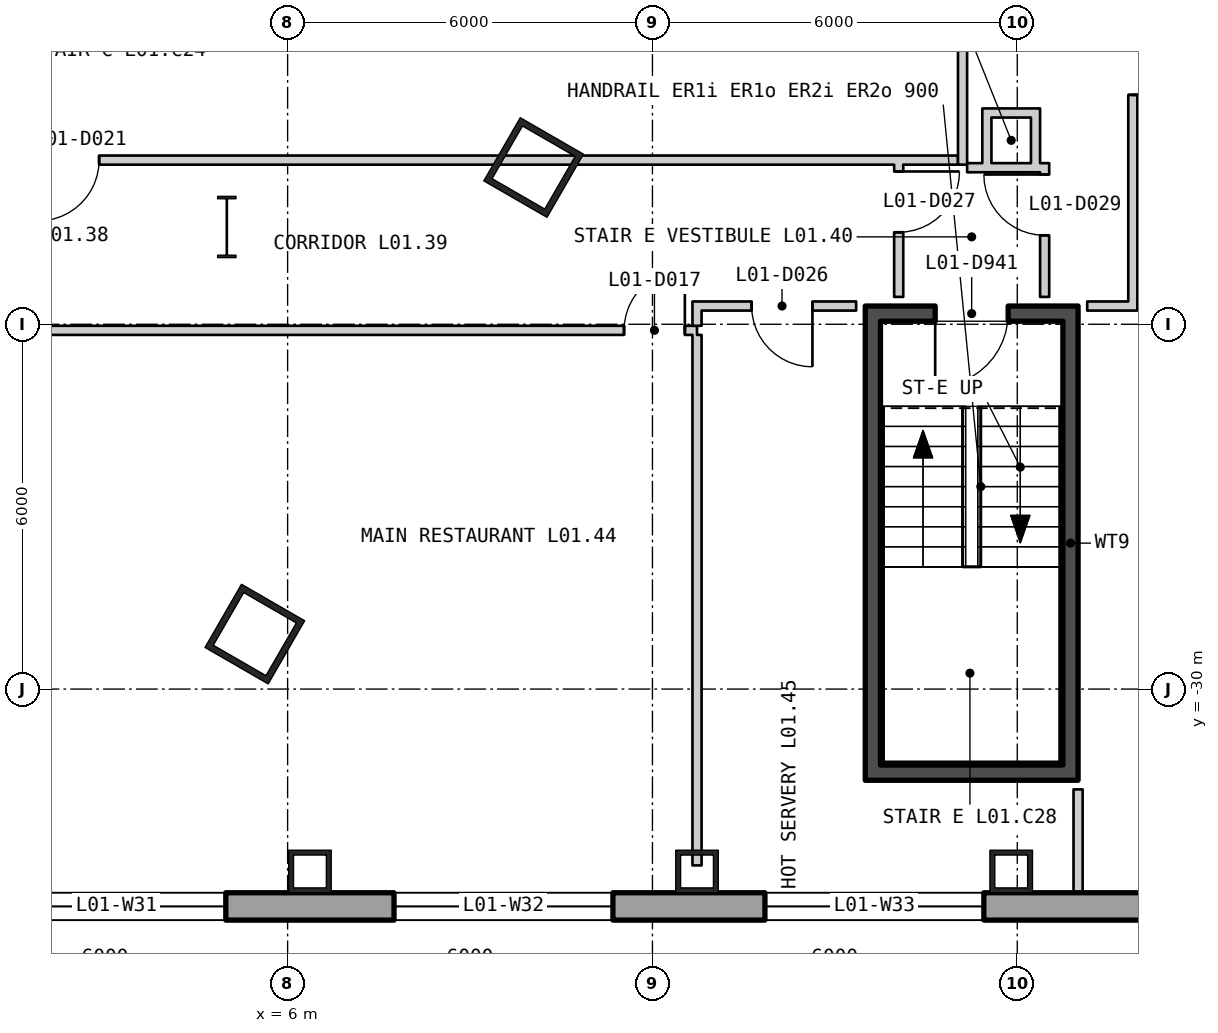
"""IFC4 building model, lengths in metres.
Left out: names, types, materials, properties, quantities, classifications, styles, units other than length and angle.
Written with IfcOpenShell. Run it as: python <this file> out.ifc"""

import sys

from ifc_helpers import new_model, si_unit, direction, frame, frame_2d, origin, origin_2d, place, context, subcontext, project, spatial, polyline, rectangle, hollow_rectangle, i_section, outline, extrude, element, fill, save


model = new_model("IFC4")
c1 = context("Model", 3, precision=1e-05, world=origin(), true_north=direction((0.0, 1.0)))
c2 = subcontext(c1, "Body", "Model", "MODEL_VIEW")
j1 = project(units=[si_unit("LENGTHUNIT", "METRE"), si_unit("PLANEANGLEUNIT", "RADIAN")], contexts=[c1])
p1 = place(None, origin())
s1 = spatial("IfcSite", under=j1, at=p1, CompositionType="ELEMENT")
p2 = place(p1, origin())
s2 = spatial("IfcBuilding", under=s1, at=p2, CompositionType="ELEMENT")
p3 = place(p2, frame((0.0, 0.0, 8.4)))
s3 = spatial("IfcBuildingStorey", under=s2, at=p3, CompositionType="ELEMENT", Elevation=8.4)
for number, where, z_axis, x_axis in (
    (1, (5.461, -29.096, 0.0), (0.0, 0.0, 1.0), (0.5, 0.866, 0.0)),
    (2, (10.046, -21.422, 0.0), (0.0, 0.0, 1.0), (0.5, 0.866, 0.0)),
):
    element("IfcColumn", number, at=place(p3, frame(where, z_axis=z_axis, x_axis=x_axis)), inside=s3, PredefinedType="COLUMN", context=c2, shape_type="SweptSolid", body=[
        extrude(hollow_rectangle(XDim=1.2, YDim=1.2, WallThickness=0.1, at=origin_2d()), origin(), (0.0, 0.0, 1.0), 5.1),
    ])
p4 = place(p3, frame((5.0, -22.4, 0.0), z_axis=(0.0, 0.0, 1.0), x_axis=(1.0, 0.0, 0.0)))
e3 = element("IfcColumn", 3, at=p4, inside=s3, PredefinedType="COLUMN", context=c2, shape_type="SweptSolid", body=[
    extrude(i_section(OverallWidth=0.302, OverallDepth=1.008, WebThickness=0.021, FlangeThickness=0.04, at=origin_2d()), origin(), (0.0, 0.0, 1.0), 5.1),
])
for number, where, z_axis, x_axis in (
    (4, (6.367, -33.0, 0.0), (0.0, 0.0, 1.0), (1.0, 0.0, 0.0)),
    (5, (12.733, -33.0, 0.0), (0.0, 0.0, 1.0), (1.0, 0.0, 0.0)),
    (6, (17.9, -33.0, 0.0), (0.0, 0.0, 1.0), (1.0, 0.0, 0.0)),
):
    element("IfcColumn", number, at=place(p3, frame(where, z_axis=z_axis, x_axis=x_axis)), inside=s3, PredefinedType="COLUMN", context=c2, shape_type="SweptSolid", body=[
        extrude(hollow_rectangle(XDim=0.7, YDim=0.7, WallThickness=0.08, at=origin_2d()), origin(), (0.0, 0.0, 1.0), 5.1),
    ])
p5 = place(p3, frame((-38.775, -33.575, -0.4), z_axis=(0.0, 0.0, 1.0), x_axis=(1.0, 0.0, 0.0)))
e7 = element("IfcWall", 7, at=p5, inside=s3, PredefinedType="SOLIDWALL", context=c2, shape_type="SweptSolid", body=[
    extrude(outline(polyline([(-0.225, -0.225), (77.775, -0.225), (77.325, 0.225), (0.225, 0.225), (-0.225, -0.225)])), origin(), (0.0, 0.0, 1.0), 5.1),
])
p6 = place(p5, frame((1.958, 0.0, 1.3)))
e8 = element("IfcOpeningElement", 8, at=p6, cuts=e7, PredefinedType="OPENING", context=c2, shape_type="SweptSolid", body=[
    extrude(rectangle(XDim=3.6, YDim=3.2, at=frame_2d((1.8, 1.6))), frame((0.0, 0.235, 0.0), z_axis=(0.0, -1.0, 0.0), x_axis=(1.0, 0.0, 0.0)), (0.0, 0.0, 1.0), 0.47),
])
p7 = place(p5, frame((8.325, 0.0, 1.3)))
e9 = element("IfcOpeningElement", 9, at=p7, cuts=e7, PredefinedType="OPENING", context=c2, shape_type="SweptSolid", body=[
    extrude(rectangle(XDim=3.6, YDim=3.2, at=frame_2d((1.8, 1.6))), frame((0.0, 0.235, 0.0), z_axis=(0.0, -1.0, 0.0), x_axis=(1.0, 0.0, 0.0)), (0.0, 0.0, 1.0), 0.47),
])
p8 = place(p5, frame((14.692, 0.0, 1.3)))
e10 = element("IfcOpeningElement", 10, at=p8, cuts=e7, PredefinedType="OPENING", context=c2, shape_type="SweptSolid", body=[
    extrude(rectangle(XDim=3.6, YDim=3.2, at=frame_2d((1.8, 1.6))), frame((0.0, 0.235, 0.0), z_axis=(0.0, -1.0, 0.0), x_axis=(1.0, 0.0, 0.0)), (0.0, 0.0, 1.0), 0.47),
])
p9 = place(p5, frame((21.325, 0.0, 1.3)))
e11 = element("IfcOpeningElement", 11, at=p9, cuts=e7, PredefinedType="OPENING", context=c2, shape_type="SweptSolid", body=[
    extrude(rectangle(XDim=3.6, YDim=3.2, at=frame_2d((1.8, 1.6))), frame((0.0, 0.235, 0.0), z_axis=(0.0, -1.0, 0.0), x_axis=(1.0, 0.0, 0.0)), (0.0, 0.0, 1.0), 0.47),
])
p10 = place(p5, frame((27.425, 0.0, 1.3)))
e12 = element("IfcOpeningElement", 12, at=p10, cuts=e7, PredefinedType="OPENING", context=c2, shape_type="SweptSolid", body=[
    extrude(rectangle(XDim=3.6, YDim=3.2, at=frame_2d((1.8, 1.6))), frame((0.0, 0.235, 0.0), z_axis=(0.0, -1.0, 0.0), x_axis=(1.0, 0.0, 0.0)), (0.0, 0.0, 1.0), 0.47),
])
p11 = place(p5, frame((33.792, 0.0, 1.3)))
e13 = element("IfcOpeningElement", 13, at=p11, cuts=e7, PredefinedType="OPENING", context=c2, shape_type="SweptSolid", body=[
    extrude(rectangle(XDim=3.6, YDim=3.2, at=frame_2d((1.8, 1.6))), frame((0.0, 0.235, 0.0), z_axis=(0.0, -1.0, 0.0), x_axis=(1.0, 0.0, 0.0)), (0.0, 0.0, 1.0), 0.47),
])
p12 = place(p5, frame((40.158, 0.0, 1.3)))
e14 = element("IfcOpeningElement", 14, at=p12, cuts=e7, PredefinedType="OPENING", context=c2, shape_type="SweptSolid", body=[
    extrude(rectangle(XDim=3.6, YDim=3.2, at=frame_2d((1.8, 1.6))), frame((0.0, 0.235, 0.0), z_axis=(0.0, -1.0, 0.0), x_axis=(1.0, 0.0, 0.0)), (0.0, 0.0, 1.0), 0.47),
])
p13 = place(p5, frame((46.525, 0.0, 1.3)))
e15 = element("IfcOpeningElement", 15, at=p13, cuts=e7, PredefinedType="OPENING", context=c2, shape_type="SweptSolid", body=[
    extrude(rectangle(XDim=3.6, YDim=3.2, at=frame_2d((1.8, 1.6))), frame((0.0, 0.235, 0.0), z_axis=(0.0, -1.0, 0.0), x_axis=(1.0, 0.0, 0.0)), (0.0, 0.0, 1.0), 0.47),
])
p14 = place(p5, frame((52.625, 0.0, 1.3)))
e16 = element("IfcOpeningElement", 16, at=p14, cuts=e7, PredefinedType="OPENING", context=c2, shape_type="SweptSolid", body=[
    extrude(rectangle(XDim=3.6, YDim=3.2, at=frame_2d((1.8, 1.6))), frame((0.0, 0.235, 0.0), z_axis=(0.0, -1.0, 0.0), x_axis=(1.0, 0.0, 0.0)), (0.0, 0.0, 1.0), 0.47),
])
p15 = place(p5, frame((59.258, 0.0, 1.3)))
e17 = element("IfcOpeningElement", 17, at=p15, cuts=e7, PredefinedType="OPENING", context=c2, shape_type="SweptSolid", body=[
    extrude(rectangle(XDim=3.6, YDim=3.2, at=frame_2d((1.8, 1.6))), frame((0.0, 0.235, 0.0), z_axis=(0.0, -1.0, 0.0), x_axis=(1.0, 0.0, 0.0)), (0.0, 0.0, 1.0), 0.47),
])
p16 = place(p5, frame((65.625, 0.0, 1.3)))
e18 = element("IfcOpeningElement", 18, at=p16, cuts=e7, PredefinedType="OPENING", context=c2, shape_type="SweptSolid", body=[
    extrude(rectangle(XDim=3.6, YDim=3.2, at=frame_2d((1.8, 1.6))), frame((0.0, 0.235, 0.0), z_axis=(0.0, -1.0, 0.0), x_axis=(1.0, 0.0, 0.0)), (0.0, 0.0, 1.0), 0.47),
])
p17 = place(p5, frame((71.992, 0.0, 1.3)))
e19 = element("IfcOpeningElement", 19, at=p17, cuts=e7, PredefinedType="OPENING", context=c2, shape_type="SweptSolid", body=[
    extrude(rectangle(XDim=3.6, YDim=3.2, at=frame_2d((1.8, 1.6))), frame((0.0, 0.235, 0.0), z_axis=(0.0, -1.0, 0.0), x_axis=(1.0, 0.0, 0.0)), (0.0, 0.0, 1.0), 0.47),
])
for number, where, z_axis, x_axis in (
    (20, (15.625, -31.25, 0.0), (0.0, 0.0, 1.0), (0.0, 1.0, 0.0)),
    (21, (18.875, -31.25, 0.0), (0.0, 0.0, 1.0), (0.0, 1.0, 0.0)),
):
    element("IfcWall", number, at=place(p3, frame(where, z_axis=z_axis, x_axis=x_axis)), inside=s3, PredefinedType="SHEAR", context=c2, shape_type="SweptSolid", body=[
        extrude(rectangle(XDim=7.3, YDim=0.25, at=frame_2d((3.65, 0.0))), origin(), (0.0, 0.0, 1.0), 4.88),
    ])
p18 = place(p3, frame((15.5, -31.375, 0.0), z_axis=(0.0, 0.0, 1.0), x_axis=(1.0, 0.0, 0.0)))
e22 = element("IfcWall", 22, at=p18, inside=s3, PredefinedType="SHEAR", context=c2, shape_type="SweptSolid", body=[
    extrude(rectangle(XDim=3.5, YDim=0.25, at=frame_2d((1.75, 0.0))), origin(), (0.0, 0.0, 1.0), 4.88),
])
p19 = place(p3, frame((15.5, -23.825, 0.0), z_axis=(0.0, 0.0, 1.0), x_axis=(1.0, 0.0, 0.0)))
e23 = element("IfcWall", 23, at=p19, inside=s3, PredefinedType="SHEAR", context=c2, shape_type="SweptSolid", body=[
    extrude(rectangle(XDim=3.5, YDim=0.25, at=frame_2d((1.75, 0.0))), origin(), (0.0, 0.0, 1.0), 4.88),
])
p20 = place(p19, frame((1.15, 0.0, 0.0)))
e24 = element("IfcOpeningElement", 24, at=p20, cuts=e23, PredefinedType="OPENING", context=c2, shape_type="SweptSolid", body=[
    extrude(rectangle(XDim=1.2, YDim=2.1, at=frame_2d((0.6, 1.05))), frame((0.0, 0.135, 0.0), z_axis=(0.0, -1.0, 0.0), x_axis=(1.0, 0.0, 0.0)), (0.0, 0.0, 1.0), 0.27),
])
p21 = place(p3, frame((-4.635, -24.1, 0.0), z_axis=(0.0, 0.0, 1.0), x_axis=(1.0, 0.0, 0.0)))
e25 = element("IfcWall", 25, at=p21, inside=s3, PredefinedType="PARTITIONING", context=c2, shape_type="SweptSolid", body=[
    extrude(rectangle(XDim=17.368, YDim=0.15, at=frame_2d((8.684, 0.0))), origin(), (0.0, 0.0, 1.0), 4.88),
])
p22 = place(p21, frame((3.622, 0.0, 0.0)))
e26 = element("IfcOpeningElement", 26, at=p22, cuts=e25, PredefinedType="OPENING", context=c2, shape_type="SweptSolid", body=[
    extrude(rectangle(XDim=1.8, YDim=2.1, at=frame_2d((0.9, 1.05))), frame((0.0, 0.085, 0.0), z_axis=(0.0, -1.0, 0.0), x_axis=(1.0, 0.0, 0.0)), (0.0, 0.0, 1.0), 0.17),
])
p23 = place(p21, frame((16.168, 0.0, 0.0)))
e27 = element("IfcOpeningElement", 27, at=p23, cuts=e25, PredefinedType="OPENING", context=c2, shape_type="SweptSolid", body=[
    extrude(rectangle(XDim=1.0, YDim=2.1, at=frame_2d((0.5, 1.05))), frame((0.0, 0.085, 0.0), z_axis=(0.0, -1.0, 0.0), x_axis=(1.0, 0.0, 0.0)), (0.0, 0.0, 1.0), 0.17),
])
p24 = place(p3, frame((1.7, -21.3, 0.0), z_axis=(0.0, 0.0, 1.0), x_axis=(1.0, 0.0, 0.0)))
e28 = element("IfcWall", 28, at=p24, inside=s3, PredefinedType="PARTITIONING", context=c2, shape_type="SweptSolid", body=[
    extrude(rectangle(XDim=15.325, YDim=0.15, at=frame_2d((7.662, 0.0))), origin(), (0.0, 0.0, 1.0), 4.88),
])
p25 = place(p24, frame((0.2, 0.0, 0.0)))
e29 = element("IfcOpeningElement", 29, at=p25, cuts=e28, PredefinedType="OPENING", context=c2, shape_type="SweptSolid", body=[
    extrude(rectangle(XDim=1.0, YDim=2.1, at=frame_2d((0.5, 1.05))), frame((0.0, 0.085, 0.0), z_axis=(0.0, -1.0, 0.0), x_axis=(1.0, 0.0, 0.0)), (0.0, 0.0, 1.0), 0.17),
])
p26 = place(p3, frame((12.733, -32.9, 0.0), z_axis=(0.0, 0.0, 1.0), x_axis=(0.0, 1.0, 0.0)))
e30 = element("IfcWall", 30, at=p26, inside=s3, PredefinedType="PARTITIONING", context=c2, shape_type="SweptSolid", body=[
    extrude(rectangle(XDim=8.725, YDim=0.15, at=frame_2d((4.362, 0.0))), origin(), (0.0, 0.0, 1.0), 4.19),
])
p27 = place(p3, frame((12.733, -24.025, 0.0), z_axis=(0.0, 0.0, 1.0), x_axis=(0.0, 1.0, 0.0)))
e31 = element("IfcWall", 31, at=p27, inside=s3, PredefinedType="PARTITIONING", context=c2, shape_type="SweptSolid", body=[
    extrude(rectangle(XDim=0.4, YDim=0.15, at=frame_2d((0.2, 0.0))), origin(), (0.0, 0.0, 1.0), 4.88),
])
p28 = place(p3, frame((12.808, -23.7, 0.0), z_axis=(0.0, 0.0, 1.0), x_axis=(1.0, 0.0, 0.0)))
e32 = element("IfcWall", 32, at=p28, inside=s3, PredefinedType="PARTITIONING", context=c2, shape_type="SweptSolid", body=[
    extrude(rectangle(XDim=2.542, YDim=0.15, at=frame_2d((1.271, 0.0))), origin(), (0.0, 0.0, 1.0), 4.88),
])
p29 = place(p28, frame((0.823, 0.0, 0.0)))
e33 = element("IfcOpeningElement", 33, at=p29, cuts=e32, PredefinedType="OPENING", context=c2, shape_type="SweptSolid", body=[
    extrude(rectangle(XDim=1.0, YDim=2.1, at=frame_2d((0.5, 1.05))), frame((0.0, 0.085, 0.0), z_axis=(0.0, -1.0, 0.0), x_axis=(1.0, 0.0, 0.0)), (0.0, 0.0, 1.0), 0.17),
])
p30 = place(p3, frame((16.05, -23.55, 0.0), z_axis=(0.0, 0.0, 1.0), x_axis=(0.0, 1.0, 0.0)))
e34 = element("IfcWall", 34, at=p30, inside=s3, PredefinedType="PARTITIONING", context=c2, shape_type="SweptSolid", body=[
    extrude(rectangle(XDim=2.175, YDim=0.15, at=frame_2d((1.087, 0.0))), origin(), (0.0, 0.0, 1.0), 4.88),
])
p31 = place(p30, frame((1.063, 0.0, 0.0)))
e35 = element("IfcOpeningElement", 35, at=p31, cuts=e34, PredefinedType="OPENING", context=c2, shape_type="SweptSolid", body=[
    extrude(rectangle(XDim=1.0, YDim=2.1, at=frame_2d((0.5, 1.05))), frame((0.0, 0.085, 0.0), z_axis=(0.0, -1.0, 0.0), x_axis=(1.0, 0.0, 0.0)), (0.0, 0.0, 1.0), 0.17),
])
p32 = place(p3, frame((17.1, -21.375, 0.0), z_axis=(0.0, 0.0, 1.0), x_axis=(0.0, 1.0, 0.0)))
e36 = element("IfcWall", 36, at=p32, inside=s3, PredefinedType="PARTITIONING", context=c2, shape_type="SweptSolid", body=[
    extrude(rectangle(XDim=19.05, YDim=0.15, at=frame_2d((9.525, 0.0))), origin(), (0.0, 0.0, 1.0), 4.88),
])
p33 = place(p3, frame((17.175, -21.425, 0.0), z_axis=(0.0, 0.0, 1.0), x_axis=(1.0, 0.0, 0.0)))
e37 = element("IfcWall", 37, at=p33, inside=s3, PredefinedType="PARTITIONING", context=c2, shape_type="SweptSolid", body=[
    extrude(rectangle(XDim=0.25, YDim=0.15, at=frame_2d((0.125, 0.0))), origin(), (0.0, 0.0, 1.0), 4.88),
])
p34 = place(p3, frame((17.5, -21.5, 0.0), z_axis=(0.0, 0.0, 1.0), x_axis=(0.0, 1.0, 0.0)))
e38 = element("IfcWall", 38, at=p34, inside=s3, PredefinedType="PARTITIONING", context=c2, shape_type="SweptSolid", body=[
    extrude(rectangle(XDim=1.05, YDim=0.15, at=frame_2d((0.525, 0.0))), origin(), (0.0, 0.0, 1.0), 4.88),
])
for number, where, z_axis, x_axis in (
    (39, (17.575, -21.425, 0.0), (0.0, 0.0, 1.0), (1.0, 0.0, 0.0)),
    (40, (17.575, -20.525, 0.0), (0.0, 0.0, 1.0), (1.0, 0.0, 0.0)),
):
    element("IfcWall", number, at=place(p3, frame(where, z_axis=z_axis, x_axis=x_axis)), inside=s3, PredefinedType="PARTITIONING", context=c2, shape_type="SweptSolid", body=[
        extrude(rectangle(XDim=0.65, YDim=0.15, at=frame_2d((0.325, 0.0))), origin(), (0.0, 0.0, 1.0), 4.88),
    ])
p35 = place(p3, frame((18.3, -21.5, 0.0), z_axis=(0.0, 0.0, 1.0), x_axis=(0.0, 1.0, 0.0)))
e41 = element("IfcWall", 41, at=p35, inside=s3, PredefinedType="PARTITIONING", context=c2, shape_type="SweptSolid", body=[
    extrude(rectangle(XDim=1.05, YDim=0.15, at=frame_2d((0.525, 0.0))), origin(), (0.0, 0.0, 1.0), 4.88),
])
p36 = place(p3, frame((18.45, -23.55, 0.0), z_axis=(0.0, 0.0, 1.0), x_axis=(0.0, 1.0, 0.0)))
e42 = element("IfcWall", 42, at=p36, inside=s3, PredefinedType="PARTITIONING", context=c2, shape_type="SweptSolid", body=[
    extrude(rectangle(XDim=2.2, YDim=0.15, at=frame_2d((1.1, 0.0))), origin(), (0.0, 0.0, 1.0), 4.88),
])
p37 = place(p36, frame((1.013, 0.0, 0.0)))
e43 = element("IfcOpeningElement", 43, at=p37, cuts=e42, PredefinedType="OPENING", context=c2, shape_type="SweptSolid", body=[
    extrude(rectangle(XDim=1.0, YDim=2.1, at=frame_2d((0.5, 1.05))), frame((0.0, 0.085, 0.0), z_axis=(0.0, -1.0, 0.0), x_axis=(1.0, 0.0, 0.0)), (0.0, 0.0, 1.0), 0.17),
])
p38 = place(p3, frame((19.0, -33.348, 0.0), z_axis=(0.0, 0.0, 1.0), x_axis=(0.0, 1.0, 0.0)))
e44 = element("IfcWall", 44, at=p38, inside=s3, PredefinedType="PARTITIONING", context=c2, shape_type="SweptSolid", body=[
    extrude(rectangle(XDim=0.448, YDim=0.15, at=frame_2d((0.224, 0.0))), origin(), (0.0, 0.0, 1.0), 4.88),
])
p39 = place(p3, frame((19.0, -32.9, 0.0), z_axis=(0.0, 0.0, 1.0), x_axis=(0.0, 1.0, 0.0)))
e45 = element("IfcWall", 45, at=p39, inside=s3, PredefinedType="PARTITIONING", context=c2, shape_type="SweptSolid", body=[
    extrude(rectangle(XDim=1.25, YDim=0.15, at=frame_2d((0.625, 0.0))), origin(), (0.0, 0.0, 1.0), 4.19),
])
p40 = place(p3, frame((19.15, -23.7, 0.0), z_axis=(0.0, 0.0, 1.0), x_axis=(1.0, 0.0, 0.0)))
e46 = element("IfcWall", 46, at=p40, inside=s3, PredefinedType="PARTITIONING", context=c2, shape_type="SweptSolid", body=[
    extrude(rectangle(XDim=0.675, YDim=0.15, at=frame_2d((0.338, 0.0))), origin(), (0.0, 0.0, 1.0), 4.88),
])
p41 = place(p3, frame((19.9, -23.775, 0.0), z_axis=(0.0, 0.0, 1.0), x_axis=(0.0, 1.0, 0.0)))
e47 = element("IfcWall", 47, at=p41, inside=s3, PredefinedType="PARTITIONING", context=c2, shape_type="SweptSolid", body=[
    extrude(rectangle(XDim=16.972, YDim=0.15, at=frame_2d((8.486, 0.0))), origin(), (0.0, 0.0, 1.0), 4.88),
])
p42 = place(p41, frame((3.548, 0.0, 0.0)))
e48 = element("IfcOpeningElement", 48, at=p42, cuts=e47, PredefinedType="OPENING", context=c2, shape_type="SweptSolid", body=[
    extrude(rectangle(XDim=1.8, YDim=2.1, at=frame_2d((0.9, 1.05))), frame((0.0, 0.085, 0.0), z_axis=(0.0, -1.0, 0.0), x_axis=(1.0, 0.0, 0.0)), (0.0, 0.0, 1.0), 0.17),
])
p43 = place(p3, frame((20.028, -14.826, 0.0), z_axis=(0.0, 0.0, 1.0), x_axis=(0.707106781187, -0.707106781187, 0.0)))
e49 = element("IfcWall", 49, at=p43, inside=s3, PredefinedType="PARTITIONING", context=c2, shape_type="SweptSolid", body=[
    extrude(rectangle(XDim=7.07, YDim=0.15, at=frame_2d((3.535, 0.0))), origin(), (0.0, 0.0, 1.0), 4.88),
])
p44 = place(p12, origin())
e50 = element("IfcWindow", 50, at=p44, inside=s3, PartitioningType="SINGLE_PANEL", PredefinedType="WINDOW", context=c2, shape_type="SweptSolid", body=[
    extrude(rectangle(XDim=3.6, YDim=3.2, at=frame_2d((1.8, 1.6))), frame((0.0, 0.105, 0.0), z_axis=(0.0, -1.0, 0.0), x_axis=(1.0, 0.0, 0.0)), (0.0, 0.0, 1.0), 0.06),
])
fill(e14, e50)
p45 = place(p13, origin())
e51 = element("IfcWindow", 51, at=p45, inside=s3, PartitioningType="SINGLE_PANEL", PredefinedType="WINDOW", context=c2, shape_type="SweptSolid", body=[
    extrude(rectangle(XDim=3.6, YDim=3.2, at=frame_2d((1.8, 1.6))), frame((0.0, 0.105, 0.0), z_axis=(0.0, -1.0, 0.0), x_axis=(1.0, 0.0, 0.0)), (0.0, 0.0, 1.0), 0.06),
])
fill(e15, e51)
p46 = place(p14, origin())
e52 = element("IfcWindow", 52, at=p46, inside=s3, PartitioningType="SINGLE_PANEL", PredefinedType="WINDOW", context=c2, shape_type="SweptSolid", body=[
    extrude(rectangle(XDim=3.6, YDim=3.2, at=frame_2d((1.8, 1.6))), frame((0.0, 0.105, 0.0), z_axis=(0.0, -1.0, 0.0), x_axis=(1.0, 0.0, 0.0)), (0.0, 0.0, 1.0), 0.06),
])
fill(e16, e52)
p47 = place(p20, origin())
e53 = element("IfcDoor", 53, at=p47, inside=s3, OperationType="SINGLE_SWING_LEFT", PredefinedType="DOOR", context=c2, shape_type="SweptSolid", body=[
    extrude(rectangle(XDim=1.2, YDim=2.1, at=frame_2d((0.6, 1.05))), frame((0.0, 0.025, 0.0), z_axis=(0.0, -1.0, 0.0), x_axis=(1.0, 0.0, 0.0)), (0.0, 0.0, 1.0), 0.05),
])
fill(e24, e53)
p48 = place(p23, origin())
e54 = element("IfcDoor", 54, at=p48, inside=s3, OperationType="SINGLE_SWING_LEFT", PredefinedType="DOOR", context=c2, shape_type="SweptSolid", body=[
    extrude(rectangle(XDim=1.0, YDim=2.1, at=frame_2d((0.5, 1.05))), frame((0.0, 0.025, 0.0), z_axis=(0.0, -1.0, 0.0), x_axis=(1.0, 0.0, 0.0)), (0.0, 0.0, 1.0), 0.05),
])
fill(e27, e54)
p49 = place(p25, origin())
e55 = element("IfcDoor", 55, at=p49, inside=s3, OperationType="SINGLE_SWING_LEFT", PredefinedType="DOOR", context=c2, shape_type="SweptSolid", body=[
    extrude(rectangle(XDim=1.0, YDim=2.1, at=frame_2d((0.5, 1.05))), frame((0.0, 0.025, 0.0), z_axis=(0.0, -1.0, 0.0), x_axis=(1.0, 0.0, 0.0)), (0.0, 0.0, 1.0), 0.05),
])
fill(e29, e55)
p50 = place(p29, origin())
e56 = element("IfcDoor", 56, at=p50, inside=s3, OperationType="SINGLE_SWING_RIGHT", PredefinedType="DOOR", context=c2, shape_type="SweptSolid", body=[
    extrude(rectangle(XDim=1.0, YDim=2.1, at=frame_2d((0.5, 1.05))), frame((0.0, 0.025, 0.0), z_axis=(0.0, -1.0, 0.0), x_axis=(1.0, 0.0, 0.0)), (0.0, 0.0, 1.0), 0.05),
])
fill(e33, e56)
p51 = place(p31, origin())
e57 = element("IfcDoor", 57, at=p51, inside=s3, OperationType="SINGLE_SWING_RIGHT", PredefinedType="DOOR", context=c2, shape_type="SweptSolid", body=[
    extrude(rectangle(XDim=1.0, YDim=2.1, at=frame_2d((0.5, 1.05))), frame((0.0, 0.025, 0.0), z_axis=(0.0, -1.0, 0.0), x_axis=(1.0, 0.0, 0.0)), (0.0, 0.0, 1.0), 0.05),
])
fill(e35, e57)
p52 = place(p37, origin())
e58 = element("IfcDoor", 58, at=p52, inside=s3, OperationType="SINGLE_SWING_LEFT", PredefinedType="DOOR", context=c2, shape_type="SweptSolid", body=[
    extrude(rectangle(XDim=1.0, YDim=2.1, at=frame_2d((0.5, 1.05))), frame((0.0, 0.025, 0.0), z_axis=(0.0, -1.0, 0.0), x_axis=(1.0, 0.0, 0.0)), (0.0, 0.0, 1.0), 0.05),
])
fill(e43, e58)
p53 = place(p42, origin())
e59 = element("IfcDoor", 59, at=p53, inside=s3, OperationType="DOUBLE_DOOR_SINGLE_SWING", PredefinedType="DOOR", context=c2, shape_type="SweptSolid", body=[
    extrude(rectangle(XDim=1.8, YDim=2.1, at=frame_2d((0.9, 1.05))), frame((0.0, 0.025, 0.0), z_axis=(0.0, -1.0, 0.0), x_axis=(1.0, 0.0, 0.0)), (0.0, 0.0, 1.0), 0.05),
])
fill(e48, e59)
save(model, sys.argv[1])
